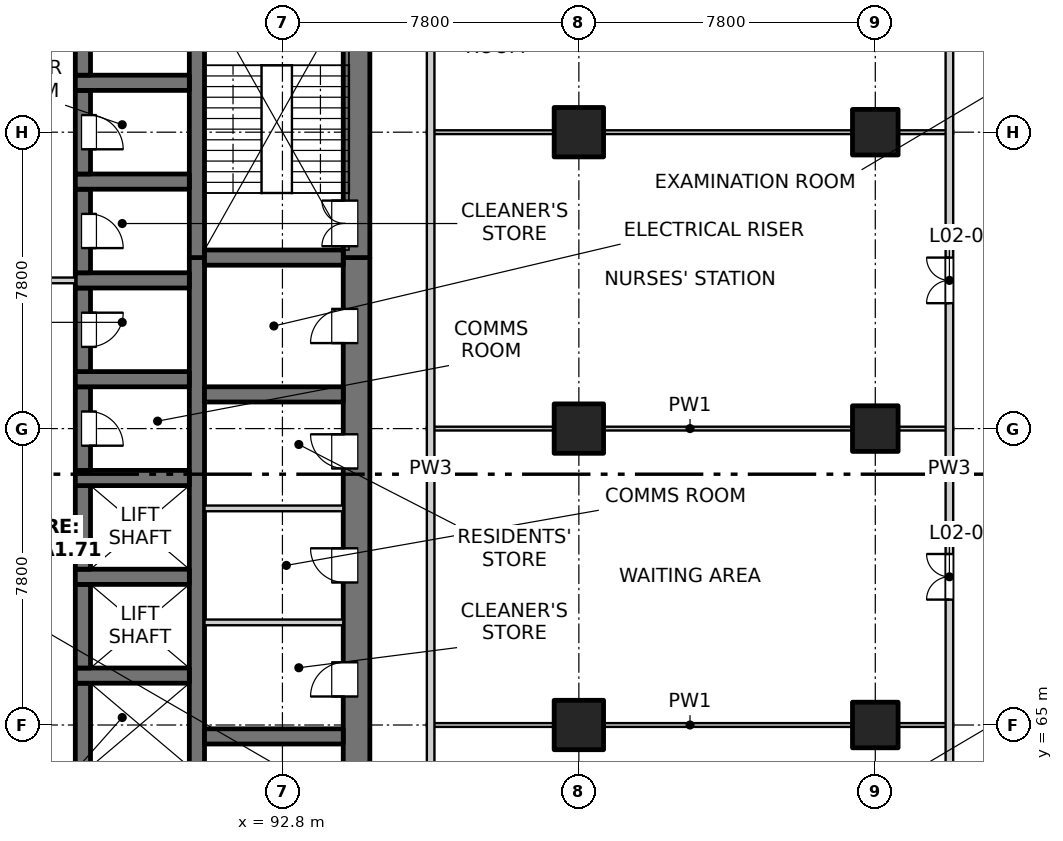
"""IFC4 building model, lengths in metres.
Left out: names, types, materials, properties, quantities, classifications, styles, units other than length and angle.
Written with IfcOpenShell. Run it as: python <this file> out.ifc"""

import sys

from ifc_helpers import new_model, si_unit, direction, frame, frame_2d, origin, origin_2d, place, context, subcontext, project, spatial, rectangle, extrude, element, fill, save


model = new_model("IFC4")
c1 = context("Model", 3, precision=1e-05, world=origin(), true_north=direction((0.0, 1.0)))
c2 = subcontext(c1, "Body", "Model", "MODEL_VIEW")
j1 = project(units=[si_unit("LENGTHUNIT", "METRE"), si_unit("PLANEANGLEUNIT", "RADIAN")], contexts=[c1])
p1 = place(None, origin())
s1 = spatial("IfcSite", under=j1, at=p1, CompositionType="ELEMENT")
p2 = place(p1, origin())
s2 = spatial("IfcBuilding", under=s1, at=p2, CompositionType="ELEMENT")
p3 = place(p2, frame((0.0, 0.0, 10.5)))
s3 = spatial("IfcBuildingStorey", under=s2, at=p3, CompositionType="ELEMENT", Elevation=10.5)
for number, where, z_axis, x_axis in (
    (1, (108.4, 65.0, -0.3), (0.0, 0.0, 1.0), (1.0, 0.0, 0.0)),
    (2, (108.4, 72.8, -0.3), (0.0, 0.0, 1.0), (1.0, 0.0, 0.0)),
    (3, (108.4, 80.6, -0.3), (0.0, 0.0, 1.0), (1.0, 0.0, 0.0)),
):
    element("IfcColumn", number, at=place(p3, frame(where, z_axis=z_axis, x_axis=x_axis)), inside=s3, PredefinedType="COLUMN", context=c2, shape_type="SweptSolid", body=[
        extrude(rectangle(XDim=1.2, YDim=1.2, at=origin_2d()), origin(), (0.0, 0.0, 1.0), 4.45),
    ])
for number, where, z_axis, x_axis in (
    (4, (100.6, 65.0, -0.3), (0.0, 0.0, 1.0), (1.0, 0.0, 0.0)),
    (5, (100.6, 72.8, -0.3), (0.0, 0.0, 1.0), (1.0, 0.0, 0.0)),
    (6, (100.6, 80.6, -0.3), (0.0, 0.0, 1.0), (1.0, 0.0, 0.0)),
):
    element("IfcColumn", number, at=place(p3, frame(where, z_axis=z_axis, x_axis=x_axis)), inside=s3, PredefinedType="COLUMN", context=c2, shape_type="SweptSolid", body=[
        extrude(rectangle(XDim=1.3, YDim=1.3, at=origin_2d()), origin(), (0.0, 0.0, 1.0), 4.45),
    ])
p4 = place(p3, frame((94.75, 61.95, -0.3), z_axis=(0.0, 0.0, 1.0), x_axis=(0.0, 1.0, 0.0)))
e7 = element("IfcWall", 7, at=p4, inside=s3, PredefinedType="SOLIDWALL", context=c2, shape_type="SweptSolid", body=[
    extrude(rectangle(XDim=15.35, YDim=0.7, at=frame_2d((7.675, 0.0))), origin(), (0.0, 0.0, 1.0), 4.45),
])
p5 = place(p4, frame((0.925, 0.0, 0.3)))
e8 = element("IfcOpeningElement", 8, at=p5, cuts=e7, PredefinedType="OPENING", context=c2, shape_type="SweptSolid", body=[
    extrude(rectangle(XDim=0.9, YDim=2.1, at=frame_2d((0.45, 1.05))), frame((0.0, 0.36, 0.0), z_axis=(0.0, -1.0, 0.0), x_axis=(1.0, 0.0, 0.0)), (0.0, 0.0, 1.0), 0.72),
])
p6 = place(p4, frame((3.8, 0.0, 0.3)))
e9 = element("IfcOpeningElement", 9, at=p6, cuts=e7, PredefinedType="OPENING", context=c2, shape_type="SweptSolid", body=[
    extrude(rectangle(XDim=0.9, YDim=2.1, at=frame_2d((0.45, 1.05))), frame((0.0, 0.36, 0.0), z_axis=(0.0, -1.0, 0.0), x_axis=(1.0, 0.0, 0.0)), (0.0, 0.0, 1.0), 0.72),
])
p7 = place(p4, frame((6.8, 0.0, 0.3)))
e10 = element("IfcOpeningElement", 10, at=p7, cuts=e7, PredefinedType="OPENING", context=c2, shape_type="SweptSolid", body=[
    extrude(rectangle(XDim=0.9, YDim=2.1, at=frame_2d((0.45, 1.05))), frame((0.0, 0.36, 0.0), z_axis=(0.0, -1.0, 0.0), x_axis=(1.0, 0.0, 0.0)), (0.0, 0.0, 1.0), 0.72),
])
p8 = place(p4, frame((9.8, 0.0, 0.3)))
e11 = element("IfcOpeningElement", 11, at=p8, cuts=e7, PredefinedType="OPENING", context=c2, shape_type="SweptSolid", body=[
    extrude(rectangle(XDim=0.9, YDim=2.1, at=frame_2d((0.45, 1.05))), frame((0.0, 0.36, 0.0), z_axis=(0.0, -1.0, 0.0), x_axis=(1.0, 0.0, 0.0)), (0.0, 0.0, 1.0), 0.72),
])
p9 = place(p4, frame((13.1, 0.0, 0.3)))
e12 = element("IfcOpeningElement", 12, at=p9, cuts=e7, PredefinedType="OPENING", context=c2, shape_type="SweptSolid", body=[
    extrude(rectangle(XDim=0.9, YDim=2.1, at=frame_2d((0.45, 1.05))), frame((0.0, 0.36, 0.0), z_axis=(0.0, -1.0, 0.0), x_axis=(1.0, 0.0, 0.0)), (0.0, 0.0, 1.0), 0.72),
])
p10 = place(p3, frame((94.75, 77.3, -0.3), z_axis=(0.0, 0.0, 1.0), x_axis=(0.0, 1.0, 0.0)))
e13 = element("IfcWall", 13, at=p10, inside=s3, PredefinedType="SOLIDWALL", context=c2, shape_type="SweptSolid", body=[
    extrude(rectangle(XDim=7.55, YDim=0.7, at=frame_2d((3.775, 0.0))), origin(), (0.0, 0.0, 1.0), 4.45),
])
p11 = place(p10, frame((0.3, 0.0, 0.3)))
e14 = element("IfcOpeningElement", 14, at=p11, cuts=e13, PredefinedType="OPENING", context=c2, shape_type="SweptSolid", body=[
    extrude(rectangle(XDim=1.2, YDim=2.1, at=frame_2d((0.6, 1.05))), frame((0.0, 0.36, 0.0), z_axis=(0.0, -1.0, 0.0), x_axis=(1.0, 0.0, 0.0)), (0.0, 0.0, 1.0), 0.72),
])
p12 = place(p3, frame((90.55, 61.95, -0.3), z_axis=(0.0, 0.0, 1.0), x_axis=(0.0, 1.0, 0.0)))
e15 = element("IfcWall", 15, at=p12, inside=s3, PredefinedType="SOLIDWALL", context=c2, shape_type="SweptSolid", body=[
    extrude(rectangle(XDim=15.35, YDim=0.4, at=frame_2d((7.675, 0.0))), origin(), (0.0, 0.0, 1.0), 4.45),
])
p13 = place(p3, frame((90.55, 77.3, -0.3), z_axis=(0.0, 0.0, 1.0), x_axis=(0.0, 1.0, 0.0)))
e16 = element("IfcWall", 16, at=p13, inside=s3, PredefinedType="SOLIDWALL", context=c2, shape_type="SweptSolid", body=[
    extrude(rectangle(XDim=6.85, YDim=0.4, at=frame_2d((3.425, 0.0))), origin(), (0.0, 0.0, 1.0), 4.45),
])
p14 = place(p3, frame((87.55, 63.9, -0.3), z_axis=(0.0, 0.0, 1.0), x_axis=(0.0, 1.0, 0.0)))
e17 = element("IfcWall", 17, at=p14, inside=s3, PredefinedType="SOLIDWALL", context=c2, shape_type="SweptSolid", body=[
    extrude(rectangle(XDim=2.2, YDim=0.4, at=frame_2d((1.1, 0.0))), origin(), (0.0, 0.0, 1.0), 4.45),
])
p15 = place(p3, frame((87.35, 66.3, -0.3), z_axis=(0.0, 0.0, 1.0), x_axis=(1.0, 0.0, 0.0)))
e18 = element("IfcWall", 18, at=p15, inside=s3, PredefinedType="SOLIDWALL", context=c2, shape_type="SweptSolid", body=[
    extrude(rectangle(XDim=3.0, YDim=0.4, at=frame_2d((1.5, 0.0))), origin(), (0.0, 0.0, 1.0), 4.45),
])
p16 = place(p3, frame((87.55, 66.5, -0.3), z_axis=(0.0, 0.0, 1.0), x_axis=(0.0, 1.0, 0.0)))
e19 = element("IfcWall", 19, at=p16, inside=s3, PredefinedType="SOLIDWALL", context=c2, shape_type="SweptSolid", body=[
    extrude(rectangle(XDim=2.2, YDim=0.4, at=frame_2d((1.1, 0.0))), origin(), (0.0, 0.0, 1.0), 4.45),
])
p17 = place(p3, frame((87.35, 68.9, -0.3), z_axis=(0.0, 0.0, 1.0), x_axis=(1.0, 0.0, 0.0)))
e20 = element("IfcWall", 20, at=p17, inside=s3, PredefinedType="SOLIDWALL", context=c2, shape_type="SweptSolid", body=[
    extrude(rectangle(XDim=3.0, YDim=0.4, at=frame_2d((1.5, 0.0))), origin(), (0.0, 0.0, 1.0), 4.45),
])
p18 = place(p3, frame((87.55, 69.1, -0.3), z_axis=(0.0, 0.0, 1.0), x_axis=(0.0, 1.0, 0.0)))
e21 = element("IfcWall", 21, at=p18, inside=s3, PredefinedType="SOLIDWALL", context=c2, shape_type="SweptSolid", body=[
    extrude(rectangle(XDim=2.2, YDim=0.4, at=frame_2d((1.1, 0.0))), origin(), (0.0, 0.0, 1.0), 4.45),
])
p19 = place(p3, frame((87.35, 71.5, -0.3), z_axis=(0.0, 0.0, 1.0), x_axis=(1.0, 0.0, 0.0)))
e22 = element("IfcWall", 22, at=p19, inside=s3, PredefinedType="SOLIDWALL", context=c2, shape_type="SweptSolid", body=[
    extrude(rectangle(XDim=3.0, YDim=0.4, at=frame_2d((1.5, 0.0))), origin(), (0.0, 0.0, 1.0), 4.45),
])
p20 = place(p3, frame((87.55, 71.7, -0.3), z_axis=(0.0, 0.0, 1.0), x_axis=(0.0, 1.0, 0.0)))
e23 = element("IfcWall", 23, at=p20, inside=s3, PredefinedType="SOLIDWALL", context=c2, shape_type="SweptSolid", body=[
    extrude(rectangle(XDim=2.2, YDim=0.4, at=frame_2d((1.1, 0.0))), origin(), (0.0, 0.0, 1.0), 4.45),
])
p21 = place(p20, frame((0.65, 0.0, 0.3)))
e24 = element("IfcOpeningElement", 24, at=p21, cuts=e23, PredefinedType="OPENING", context=c2, shape_type="SweptSolid", body=[
    extrude(rectangle(XDim=0.9, YDim=2.1, at=frame_2d((0.45, 1.05))), frame((0.0, 0.21, 0.0), z_axis=(0.0, -1.0, 0.0), x_axis=(1.0, 0.0, 0.0)), (0.0, 0.0, 1.0), 0.42),
])
p22 = place(p3, frame((87.35, 74.1, -0.3), z_axis=(0.0, 0.0, 1.0), x_axis=(1.0, 0.0, 0.0)))
e25 = element("IfcWall", 25, at=p22, inside=s3, PredefinedType="SOLIDWALL", context=c2, shape_type="SweptSolid", body=[
    extrude(rectangle(XDim=3.0, YDim=0.4, at=frame_2d((1.5, 0.0))), origin(), (0.0, 0.0, 1.0), 4.45),
])
p23 = place(p3, frame((87.55, 74.3, -0.3), z_axis=(0.0, 0.0, 1.0), x_axis=(0.0, 1.0, 0.0)))
e26 = element("IfcWall", 26, at=p23, inside=s3, PredefinedType="SOLIDWALL", context=c2, shape_type="SweptSolid", body=[
    extrude(rectangle(XDim=2.2, YDim=0.4, at=frame_2d((1.1, 0.0))), origin(), (0.0, 0.0, 1.0), 4.45),
])
p24 = place(p23, frame((0.65, 0.0, 0.3)))
e27 = element("IfcOpeningElement", 27, at=p24, cuts=e26, PredefinedType="OPENING", context=c2, shape_type="SweptSolid", body=[
    extrude(rectangle(XDim=0.9, YDim=2.1, at=frame_2d((0.45, 1.05))), frame((0.0, 0.21, 0.0), z_axis=(0.0, -1.0, 0.0), x_axis=(1.0, 0.0, 0.0)), (0.0, 0.0, 1.0), 0.42),
])
p25 = place(p3, frame((87.35, 76.7, -0.3), z_axis=(0.0, 0.0, 1.0), x_axis=(1.0, 0.0, 0.0)))
e28 = element("IfcWall", 28, at=p25, inside=s3, PredefinedType="SOLIDWALL", context=c2, shape_type="SweptSolid", body=[
    extrude(rectangle(XDim=3.0, YDim=0.4, at=frame_2d((1.5, 0.0))), origin(), (0.0, 0.0, 1.0), 4.45),
])
p26 = place(p3, frame((87.55, 76.9, -0.3), z_axis=(0.0, 0.0, 1.0), x_axis=(0.0, 1.0, 0.0)))
e29 = element("IfcWall", 29, at=p26, inside=s3, PredefinedType="SOLIDWALL", context=c2, shape_type="SweptSolid", body=[
    extrude(rectangle(XDim=2.2, YDim=0.4, at=frame_2d((1.1, 0.0))), origin(), (0.0, 0.0, 1.0), 4.45),
])
p27 = place(p26, frame((0.65, 0.0, 0.3)))
e30 = element("IfcOpeningElement", 30, at=p27, cuts=e29, PredefinedType="OPENING", context=c2, shape_type="SweptSolid", body=[
    extrude(rectangle(XDim=0.9, YDim=2.1, at=frame_2d((0.45, 1.05))), frame((0.0, 0.21, 0.0), z_axis=(0.0, -1.0, 0.0), x_axis=(1.0, 0.0, 0.0)), (0.0, 0.0, 1.0), 0.42),
])
p28 = place(p3, frame((87.35, 79.3, -0.3), z_axis=(0.0, 0.0, 1.0), x_axis=(1.0, 0.0, 0.0)))
e31 = element("IfcWall", 31, at=p28, inside=s3, PredefinedType="SOLIDWALL", context=c2, shape_type="SweptSolid", body=[
    extrude(rectangle(XDim=3.0, YDim=0.4, at=frame_2d((1.5, 0.0))), origin(), (0.0, 0.0, 1.0), 4.45),
])
p29 = place(p3, frame((87.55, 79.5, -0.3), z_axis=(0.0, 0.0, 1.0), x_axis=(0.0, 1.0, 0.0)))
e32 = element("IfcWall", 32, at=p29, inside=s3, PredefinedType="SOLIDWALL", context=c2, shape_type="SweptSolid", body=[
    extrude(rectangle(XDim=2.2, YDim=0.4, at=frame_2d((1.1, 0.0))), origin(), (0.0, 0.0, 1.0), 4.45),
])
p30 = place(p29, frame((0.65, 0.0, 0.3)))
e33 = element("IfcOpeningElement", 33, at=p30, cuts=e32, PredefinedType="OPENING", context=c2, shape_type="SweptSolid", body=[
    extrude(rectangle(XDim=0.9, YDim=2.1, at=frame_2d((0.45, 1.05))), frame((0.0, 0.21, 0.0), z_axis=(0.0, -1.0, 0.0), x_axis=(1.0, 0.0, 0.0)), (0.0, 0.0, 1.0), 0.42),
])
p31 = place(p3, frame((87.35, 81.9, -0.3), z_axis=(0.0, 0.0, 1.0), x_axis=(1.0, 0.0, 0.0)))
e34 = element("IfcWall", 34, at=p31, inside=s3, PredefinedType="SOLIDWALL", context=c2, shape_type="SweptSolid", body=[
    extrude(rectangle(XDim=3.0, YDim=0.4, at=frame_2d((1.5, 0.0))), origin(), (0.0, 0.0, 1.0), 4.45),
])
p32 = place(p3, frame((87.55, 82.1, -0.3), z_axis=(0.0, 0.0, 1.0), x_axis=(0.0, 1.0, 0.0)))
e35 = element("IfcWall", 35, at=p32, inside=s3, PredefinedType="SOLIDWALL", context=c2, shape_type="SweptSolid", body=[
    extrude(rectangle(XDim=2.05, YDim=0.4, at=frame_2d((1.025, 0.0))), origin(), (0.0, 0.0, 1.0), 4.45),
])
p33 = place(p32, frame((0.65, 0.0, 0.3)))
e36 = element("IfcOpeningElement", 36, at=p33, cuts=e35, PredefinedType="OPENING", context=c2, shape_type="SweptSolid", body=[
    extrude(rectangle(XDim=0.9, YDim=2.1, at=frame_2d((0.45, 1.05))), frame((0.0, 0.21, 0.0), z_axis=(0.0, -1.0, 0.0), x_axis=(1.0, 0.0, 0.0)), (0.0, 0.0, 1.0), 0.42),
])
for number, where, z_axis, x_axis in (
    (37, (90.75, 64.7, -0.3), (0.0, 0.0, 1.0), (1.0, 0.0, 0.0)),
    (38, (90.75, 73.7, -0.3), (0.0, 0.0, 1.0), (1.0, 0.0, 0.0)),
    (39, (90.75, 77.3, -0.3), (0.0, 0.0, 1.0), (1.0, 0.0, 0.0)),
):
    element("IfcWall", number, at=place(p3, frame(where, z_axis=z_axis, x_axis=x_axis)), inside=s3, PredefinedType="SOLIDWALL", context=c2, shape_type="SweptSolid", body=[
        extrude(rectangle(XDim=3.65, YDim=0.4, at=frame_2d((1.825, 0.0))), origin(), (0.0, 0.0, 1.0), 4.45),
    ])
p34 = place(p3, frame((96.6, 65.0, 0.0), z_axis=(0.0, 0.0, 1.0), x_axis=(1.0, 0.0, 0.0)))
e40 = element("IfcWall", 40, at=p34, inside=s3, PredefinedType="PARTITIONING", context=c2, shape_type="SweptSolid", body=[
    extrude(rectangle(XDim=13.85, YDim=0.1, at=frame_2d((6.925, 0.0))), origin(), (0.0, 0.0, 1.0), 4.15),
])
for number, where, z_axis, x_axis in (
    (41, (90.75, 67.7, 0.0), (0.0, 0.0, 1.0), (1.0, 0.0, 0.0)),
    (42, (90.75, 70.7, 0.0), (0.0, 0.0, 1.0), (1.0, 0.0, 0.0)),
):
    element("IfcWall", number, at=place(p3, frame(where, z_axis=z_axis, x_axis=x_axis)), inside=s3, PredefinedType="PARTITIONING", context=c2, shape_type="SweptSolid", body=[
        extrude(rectangle(XDim=3.65, YDim=0.15, at=frame_2d((1.825, 0.0))), origin(), (0.0, 0.0, 1.0), 4.15),
    ])
p35 = place(p3, frame((96.6, 72.8, 0.0), z_axis=(0.0, 0.0, 1.0), x_axis=(1.0, 0.0, 0.0)))
e43 = element("IfcWall", 43, at=p35, inside=s3, PredefinedType="PARTITIONING", context=c2, shape_type="SweptSolid", body=[
    extrude(rectangle(XDim=13.85, YDim=0.1, at=frame_2d((6.925, 0.0))), origin(), (0.0, 0.0, 1.0), 4.15),
])
p36 = place(p3, frame((82.65, 76.7, 0.0), z_axis=(0.0, 0.0, 1.0), x_axis=(1.0, 0.0, 0.0)))
e44 = element("IfcWall", 44, at=p36, inside=s3, PredefinedType="PARTITIONING", context=c2, shape_type="SweptSolid", body=[
    extrude(rectangle(XDim=4.7, YDim=0.15, at=frame_2d((2.35, 0.0))), origin(), (0.0, 0.0, 1.0), 4.15),
])
p37 = place(p36, frame((1.45, 0.0, 0.0)))
e45 = element("IfcOpeningElement", 45, at=p37, cuts=e44, PredefinedType="OPENING", context=c2, shape_type="SweptSolid", body=[
    extrude(rectangle(XDim=1.8, YDim=2.1, at=frame_2d((0.9, 1.05))), frame((0.0, 0.085, 0.0), z_axis=(0.0, -1.0, 0.0), x_axis=(1.0, 0.0, 0.0)), (0.0, 0.0, 1.0), 0.17),
])
p38 = place(p3, frame((96.6, 80.6, 0.0), z_axis=(0.0, 0.0, 1.0), x_axis=(1.0, 0.0, 0.0)))
e46 = element("IfcWall", 46, at=p38, inside=s3, PredefinedType="PARTITIONING", context=c2, shape_type="SweptSolid", body=[
    extrude(rectangle(XDim=13.85, YDim=0.1, at=frame_2d((6.925, 0.0))), origin(), (0.0, 0.0, 1.0), 4.15),
])
p39 = place(p3, frame((96.7, 55.35, 0.0), z_axis=(0.0, 0.0, 1.0), x_axis=(0.0, 1.0, 0.0)))
e47 = element("IfcWall", 47, at=p39, inside=s3, PredefinedType="PARTITIONING", context=c2, shape_type="SweptSolid", body=[
    extrude(rectangle(XDim=32.75, YDim=0.2, at=frame_2d((16.375, 0.0))), origin(), (0.0, 0.0, 1.0), 4.15),
])
p40 = place(p3, frame((110.35, 55.35, 0.0), z_axis=(0.0, 0.0, 1.0), x_axis=(0.0, 1.0, 0.0)))
e48 = element("IfcWall", 48, at=p40, inside=s3, PredefinedType="PARTITIONING", context=c2, shape_type="SweptSolid", body=[
    extrude(rectangle(XDim=32.75, YDim=0.2, at=frame_2d((16.375, 0.0))), origin(), (0.0, 0.0, 1.0), 4.15),
])
p41 = place(p40, frame((4.175, 0.0, 0.0)))
e49 = element("IfcOpeningElement", 49, at=p41, cuts=e48, PredefinedType="OPENING", context=c2, shape_type="SweptSolid", body=[
    extrude(rectangle(XDim=1.2, YDim=2.1, at=frame_2d((0.6, 1.05))), frame((0.0, 0.11, 0.0), z_axis=(0.0, -1.0, 0.0), x_axis=(1.0, 0.0, 0.0)), (0.0, 0.0, 1.0), 0.22),
])
p42 = place(p40, frame((12.95, 0.0, 0.0)))
e50 = element("IfcOpeningElement", 50, at=p42, cuts=e48, PredefinedType="OPENING", context=c2, shape_type="SweptSolid", body=[
    extrude(rectangle(XDim=1.2, YDim=2.1, at=frame_2d((0.6, 1.05))), frame((0.0, 0.11, 0.0), z_axis=(0.0, -1.0, 0.0), x_axis=(1.0, 0.0, 0.0)), (0.0, 0.0, 1.0), 0.22),
])
p43 = place(p40, frame((20.75, 0.0, 0.0)))
e51 = element("IfcOpeningElement", 51, at=p43, cuts=e48, PredefinedType="OPENING", context=c2, shape_type="SweptSolid", body=[
    extrude(rectangle(XDim=1.2, YDim=2.1, at=frame_2d((0.6, 1.05))), frame((0.0, 0.11, 0.0), z_axis=(0.0, -1.0, 0.0), x_axis=(1.0, 0.0, 0.0)), (0.0, 0.0, 1.0), 0.22),
])
p44 = place(p40, frame((28.55, 0.0, 0.0)))
e52 = element("IfcOpeningElement", 52, at=p44, cuts=e48, PredefinedType="OPENING", context=c2, shape_type="SweptSolid", body=[
    extrude(rectangle(XDim=1.2, YDim=2.1, at=frame_2d((0.6, 1.05))), frame((0.0, 0.11, 0.0), z_axis=(0.0, -1.0, 0.0), x_axis=(1.0, 0.0, 0.0)), (0.0, 0.0, 1.0), 0.22),
])
p45 = place(p6, origin())
e53 = element("IfcDoor", 53, at=p45, inside=s3, OperationType="SINGLE_SWING_LEFT", PredefinedType="DOOR", context=c2, shape_type="SweptSolid", body=[
    extrude(rectangle(XDim=0.9, YDim=2.1, at=frame_2d((0.45, 1.05))), frame((0.0, 0.335, 0.0), z_axis=(0.0, -1.0, 0.0), x_axis=(1.0, 0.0, 0.0)), (0.0, 0.0, 1.0), 0.05),
])
fill(e9, e53)
p46 = place(p42, origin())
e54 = element("IfcDoor", 54, at=p46, inside=s3, OperationType="DOUBLE_DOOR_SINGLE_SWING", PredefinedType="DOOR", context=c2, shape_type="SweptSolid", body=[
    extrude(rectangle(XDim=1.2, YDim=2.1, at=frame_2d((0.6, 1.05))), frame((0.0, 0.025, 0.0), z_axis=(0.0, -1.0, 0.0), x_axis=(1.0, 0.0, 0.0)), (0.0, 0.0, 1.0), 0.05),
])
fill(e50, e54)
p47 = place(p7, origin())
e55 = element("IfcDoor", 55, at=p47, inside=s3, OperationType="SINGLE_SWING_RIGHT", PredefinedType="DOOR", context=c2, shape_type="SweptSolid", body=[
    extrude(rectangle(XDim=0.9, YDim=2.1, at=frame_2d((0.45, 1.05))), frame((0.0, 0.335, 0.0), z_axis=(0.0, -1.0, 0.0), x_axis=(1.0, 0.0, 0.0)), (0.0, 0.0, 1.0), 0.05),
])
fill(e10, e55)
p48 = place(p8, origin())
e56 = element("IfcDoor", 56, at=p48, inside=s3, OperationType="SINGLE_SWING_RIGHT", PredefinedType="DOOR", context=c2, shape_type="SweptSolid", body=[
    extrude(rectangle(XDim=0.9, YDim=2.1, at=frame_2d((0.45, 1.05))), frame((0.0, 0.335, 0.0), z_axis=(0.0, -1.0, 0.0), x_axis=(1.0, 0.0, 0.0)), (0.0, 0.0, 1.0), 0.05),
])
fill(e11, e56)
p49 = place(p21, origin())
e57 = element("IfcDoor", 57, at=p49, inside=s3, OperationType="SINGLE_SWING_RIGHT", PredefinedType="DOOR", context=c2, shape_type="SweptSolid", body=[
    extrude(rectangle(XDim=0.9, YDim=2.1, at=frame_2d((0.45, 1.05))), frame((0.0, -0.135, 0.0), z_axis=(0.0, -1.0, 0.0), x_axis=(1.0, 0.0, 0.0)), (0.0, 0.0, 1.0), 0.05),
])
fill(e24, e57)
p50 = place(p24, origin())
e58 = element("IfcDoor", 58, at=p50, inside=s3, OperationType="SINGLE_SWING_LEFT", PredefinedType="DOOR", context=c2, shape_type="SweptSolid", body=[
    extrude(rectangle(XDim=0.9, YDim=2.1, at=frame_2d((0.45, 1.05))), frame((0.0, -0.135, 0.0), z_axis=(0.0, -1.0, 0.0), x_axis=(1.0, 0.0, 0.0)), (0.0, 0.0, 1.0), 0.05),
])
fill(e27, e58)
p51 = place(p9, origin())
e59 = element("IfcDoor", 59, at=p51, inside=s3, OperationType="SINGLE_SWING_LEFT", PredefinedType="DOOR", context=c2, shape_type="SweptSolid", body=[
    extrude(rectangle(XDim=0.9, YDim=2.1, at=frame_2d((0.45, 1.05))), frame((0.0, 0.335, 0.0), z_axis=(0.0, -1.0, 0.0), x_axis=(1.0, 0.0, 0.0)), (0.0, 0.0, 1.0), 0.05),
])
fill(e12, e59)
p52 = place(p43, origin())
e60 = element("IfcDoor", 60, at=p52, inside=s3, OperationType="DOUBLE_DOOR_SINGLE_SWING", PredefinedType="DOOR", context=c2, shape_type="SweptSolid", body=[
    extrude(rectangle(XDim=1.2, YDim=2.1, at=frame_2d((0.6, 1.05))), frame((0.0, 0.025, 0.0), z_axis=(0.0, -1.0, 0.0), x_axis=(1.0, 0.0, 0.0)), (0.0, 0.0, 1.0), 0.05),
])
fill(e51, e60)
p53 = place(p27, origin())
e61 = element("IfcDoor", 61, at=p53, inside=s3, OperationType="SINGLE_SWING_RIGHT", PredefinedType="DOOR", context=c2, shape_type="SweptSolid", body=[
    extrude(rectangle(XDim=0.9, YDim=2.1, at=frame_2d((0.45, 1.05))), frame((0.0, -0.135, 0.0), z_axis=(0.0, -1.0, 0.0), x_axis=(1.0, 0.0, 0.0)), (0.0, 0.0, 1.0), 0.05),
])
fill(e30, e61)
p54 = place(p11, origin())
e62 = element("IfcDoor", 62, at=p54, inside=s3, OperationType="DOUBLE_DOOR_SINGLE_SWING", PredefinedType="DOOR", context=c2, shape_type="SweptSolid", body=[
    extrude(rectangle(XDim=1.2, YDim=2.1, at=frame_2d((0.6, 1.05))), frame((0.0, 0.335, 0.0), z_axis=(0.0, -1.0, 0.0), x_axis=(1.0, 0.0, 0.0)), (0.0, 0.0, 1.0), 0.05),
])
fill(e14, e62)
p55 = place(p30, origin())
e63 = element("IfcDoor", 63, at=p55, inside=s3, OperationType="SINGLE_SWING_RIGHT", PredefinedType="DOOR", context=c2, shape_type="SweptSolid", body=[
    extrude(rectangle(XDim=0.9, YDim=2.1, at=frame_2d((0.45, 1.05))), frame((0.0, -0.135, 0.0), z_axis=(0.0, -1.0, 0.0), x_axis=(1.0, 0.0, 0.0)), (0.0, 0.0, 1.0), 0.05),
])
fill(e33, e63)
save(model, sys.argv[1])
